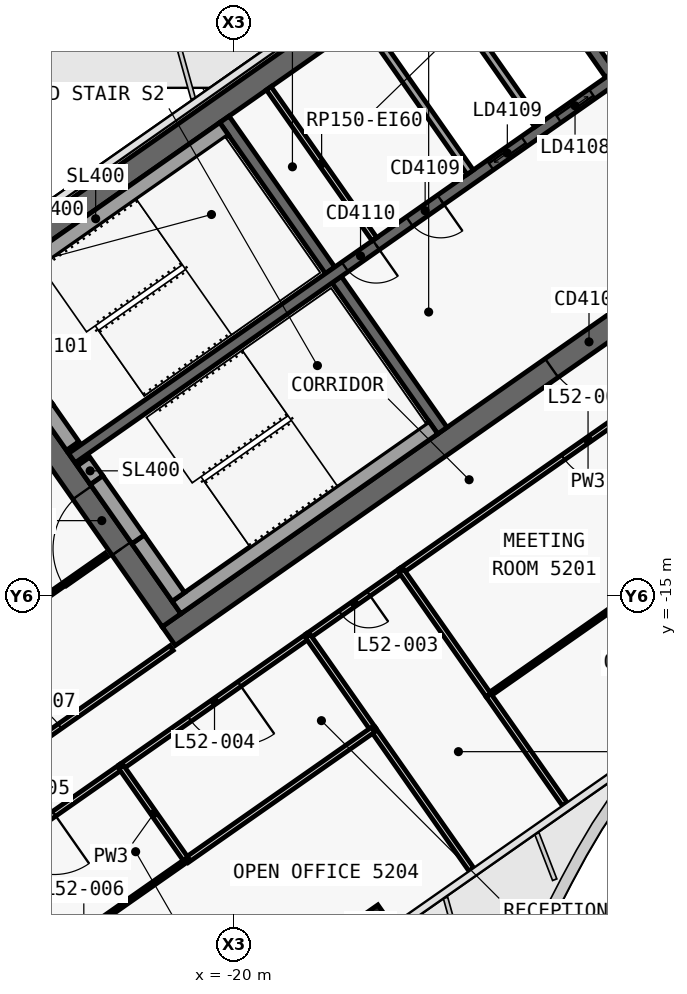
"""IFC4 building model, lengths in metres.
Left out: names, types, materials, properties, quantities, classifications, styles, units other than length and angle.
Written with IfcOpenShell. Run it as: python <this file> out.ifc"""

import sys

from ifc_helpers import new_model, si_unit, direction, frame, frame_2d, origin, origin_2d, place, context, subcontext, project, spatial, polyline, rectangle, outline, extrude, element, fill, save


model = new_model("IFC4")
c1 = context("Model", 3, precision=1e-05, world=origin(), true_north=direction((0.0, 1.0)))
c2 = subcontext(c1, "Body", "Model", "MODEL_VIEW")
j1 = project(units=[si_unit("LENGTHUNIT", "METRE"), si_unit("PLANEANGLEUNIT", "RADIAN")], contexts=[c1])
p1 = place(None, origin())
s1 = spatial("IfcSite", under=j1, at=p1, CompositionType="ELEMENT")
p2 = place(p1, origin())
s2 = spatial("IfcBuilding", under=s1, at=p2, CompositionType="ELEMENT")
p3 = place(p2, frame((0.0, 0.0, 225.4)))
s3 = spatial("IfcBuildingStorey", under=s2, at=p3, CompositionType="ELEMENT", Elevation=225.4)
p4 = place(p3, frame((-0.028, 12.066, 0.0), z_axis=(0.0, 0.0, 1.0), x_axis=(-0.819151382952, -0.573577380837, 0.0)))
e1 = element("IfcWall", 1, at=p4, inside=s3, PredefinedType="SHEAR", context=c2, shape_type="SweptSolid", body=[
    extrude(outline(polyline([(33.898, 0.3), (0.42, 0.3), (0.0, -0.3), (33.898, -0.3), (33.898, 0.3)])), origin(), (0.0, 0.0, 1.0), 3.9),
])
p5 = place(p3, frame((-0.028, -0.874, 0.0), z_axis=(0.0, 0.0, 1.0), x_axis=(-0.819150035022, -0.573579305871, 0.0)))
e2 = element("IfcWall", 2, at=p5, inside=s3, PredefinedType="SHEAR", context=c2, shape_type="SweptSolid", body=[
    extrude(outline(polyline([(26.476, 0.3), (0.42, 0.3), (0.0, -0.3), (26.476, -0.3), (26.476, 0.3)])), origin(), (0.0, 0.0, 1.0), 3.9),
])
p6 = place(p5, frame((2.976, 0.0, 0.0)))
e3 = element("IfcOpeningElement", 3, at=p6, cuts=e2, PredefinedType="OPENING", context=c2, shape_type="SweptSolid", body=[
    extrude(rectangle(XDim=2.4, YDim=2.1, at=frame_2d((1.2, 1.05))), frame((0.0, 0.31, 0.0), z_axis=(0.0, -1.0, 0.0), x_axis=(1.0, 0.0, 0.0)), (0.0, 0.0, 1.0), 0.62),
])
p7 = place(p5, frame((11.776, 0.0, 0.0)))
e4 = element("IfcOpeningElement", 4, at=p7, cuts=e2, PredefinedType="OPENING", context=c2, shape_type="SweptSolid", body=[
    extrude(rectangle(XDim=2.4, YDim=2.1, at=frame_2d((1.2, 1.05))), frame((0.0, 0.31, 0.0), z_axis=(0.0, -1.0, 0.0), x_axis=(1.0, 0.0, 0.0)), (0.0, 0.0, 1.0), 0.62),
])
p8 = place(p3, frame((-21.642, -15.642, 0.0), z_axis=(0.0, 0.0, 1.0), x_axis=(-0.573586866468, 0.819144740944, 0.0)))
e5 = element("IfcWall", 5, at=p8, inside=s3, PredefinedType="SHEAR", context=c2, shape_type="SweptSolid", body=[
    extrude(outline(polyline([(0.0, 0.3), (0.0, -0.3), (10.0, -0.3), (10.0, 0.3), (0.0, 0.3)])), origin(), (0.0, 0.0, 1.0), 3.9),
])
p9 = place(p8, frame((6.5, 0.0, 0.0)))
e6 = element("IfcOpeningElement", 6, at=p9, cuts=e5, PredefinedType="OPENING", context=c2, shape_type="SweptSolid", body=[
    extrude(rectangle(XDim=1.8, YDim=2.1, at=frame_2d((0.9, 1.05))), frame((0.0, 0.31, 0.0), z_axis=(0.0, -1.0, 0.0), x_axis=(1.0, 0.0, 0.0)), (0.0, 0.0, 1.0), 0.62),
])
p10 = place(p8, frame((2.3, 0.0, 0.0)))
e7 = element("IfcOpeningElement", 7, at=p10, cuts=e5, PredefinedType="OPENING", context=c2, shape_type="SweptSolid", body=[
    extrude(rectangle(XDim=1.8, YDim=2.1, at=frame_2d((0.9, 1.05))), frame((0.0, 0.31, 0.0), z_axis=(0.0, -1.0, 0.0), x_axis=(1.0, 0.0, 0.0)), (0.0, 0.0, 1.0), 0.62),
])
p11 = place(p3, frame((-10.097, -1.271, 0.0), z_axis=(0.0, 0.0, 1.0), x_axis=(-0.573560315113, 0.819163332265, 0.0)))
e8 = element("IfcWall", 8, at=p11, inside=s3, PredefinedType="SHEAR", context=c2, shape_type="SweptSolid", body=[
    extrude(outline(polyline([(4.85, -0.15), (4.85, 0.15), (0.0, 0.15), (0.0, -0.15), (4.85, -0.15)])), origin(), (0.0, 0.0, 1.0), 3.9),
])
p12 = place(p3, frame((-14.515, -10.652, 0.0), z_axis=(0.0, 0.0, 1.0), x_axis=(-0.573560315113, 0.819163332265, 0.0)))
e9 = element("IfcWall", 9, at=p12, inside=s3, PredefinedType="SHEAR", context=c2, shape_type="SweptSolid", body=[
    extrude(outline(polyline([(4.85, 0.15), (0.0, 0.15), (0.0, -0.15), (4.85, -0.15), (4.85, 0.15)])), origin(), (0.0, 0.0, 1.0), 3.9),
])
p13 = place(p3, frame((-17.469, -6.433, 0.0), z_axis=(0.0, 0.0, 1.0), x_axis=(-0.573594092424, 0.81913968109, 0.0)))
e10 = element("IfcWall", 10, at=p13, inside=s3, PredefinedType="SHEAR", context=c2, shape_type="SweptSolid", body=[
    extrude(outline(polyline([(4.85, -0.15), (4.85, 0.15), (0.0, 0.15), (0.0, -0.15), (4.85, -0.15)])), origin(), (0.0, 0.0, 1.0), 3.9),
])
p14 = place(p3, frame((-2.638, 3.768, 0.0), z_axis=(0.0, 0.0, 1.0), x_axis=(-0.819155014212, -0.573572194837, 0.0)))
e11 = element("IfcWall", 11, at=p14, inside=s3, PredefinedType="SHEAR", context=c2, shape_type="SweptSolid", body=[
    extrude(outline(polyline([(26.4, 0.15), (0.0, 0.15), (0.0, -0.15), (26.4, -0.15), (26.4, 0.15)])), origin(), (0.0, 0.0, 1.0), 3.9),
])
p15 = place(p14, frame((1.169, 0.0, 0.0)))
e12 = element("IfcOpeningElement", 12, at=p15, cuts=e11, PredefinedType="OPENING", context=c2, shape_type="SweptSolid", body=[
    extrude(rectangle(XDim=1.1, YDim=2.1, at=frame_2d((0.55, 1.05))), frame((0.0, 0.16, 0.0), z_axis=(0.0, -1.0, 0.0), x_axis=(1.0, 0.0, 0.0)), (0.0, 0.0, 1.0), 0.32),
])
p16 = place(p14, frame((3.206, 0.0, 0.0)))
e13 = element("IfcOpeningElement", 13, at=p16, cuts=e11, PredefinedType="OPENING", context=c2, shape_type="SweptSolid", body=[
    extrude(rectangle(XDim=1.1, YDim=2.1, at=frame_2d((0.55, 1.05))), frame((0.0, 0.16, 0.0), z_axis=(0.0, -1.0, 0.0), x_axis=(1.0, 0.0, 0.0)), (0.0, 0.0, 1.0), 0.32),
])
p17 = place(p14, frame((5.244, 0.0, 0.0)))
e14 = element("IfcOpeningElement", 14, at=p17, cuts=e11, PredefinedType="OPENING", context=c2, shape_type="SweptSolid", body=[
    extrude(rectangle(XDim=1.1, YDim=2.1, at=frame_2d((0.55, 1.05))), frame((0.0, 0.16, 0.0), z_axis=(0.0, -1.0, 0.0), x_axis=(1.0, 0.0, 0.0)), (0.0, 0.0, 1.0), 0.32),
])
p18 = place(p14, frame((7.281, 0.0, 0.0)))
e15 = element("IfcOpeningElement", 15, at=p18, cuts=e11, PredefinedType="OPENING", context=c2, shape_type="SweptSolid", body=[
    extrude(rectangle(XDim=1.1, YDim=2.1, at=frame_2d((0.55, 1.05))), frame((0.0, 0.16, 0.0), z_axis=(0.0, -1.0, 0.0), x_axis=(1.0, 0.0, 0.0)), (0.0, 0.0, 1.0), 0.32),
])
p19 = place(p14, frame((9.688, 0.0, 0.0)))
e16 = element("IfcOpeningElement", 16, at=p19, cuts=e11, PredefinedType="OPENING", context=c2, shape_type="SweptSolid", body=[
    extrude(rectangle(XDim=1.1, YDim=2.1, at=frame_2d((0.55, 1.05))), frame((0.0, 0.16, 0.0), z_axis=(0.0, -1.0, 0.0), x_axis=(1.0, 0.0, 0.0)), (0.0, 0.0, 1.0), 0.32),
])
p20 = place(p14, frame((11.863, 0.0, 0.0)))
e17 = element("IfcOpeningElement", 17, at=p20, cuts=e11, PredefinedType="OPENING", context=c2, shape_type="SweptSolid", body=[
    extrude(rectangle(XDim=1.1, YDim=2.1, at=frame_2d((0.55, 1.05))), frame((0.0, 0.16, 0.0), z_axis=(0.0, -1.0, 0.0), x_axis=(1.0, 0.0, 0.0)), (0.0, 0.0, 1.0), 0.32),
])
p21 = place(p14, frame((14.552, 0.0, 0.0)))
e18 = element("IfcOpeningElement", 18, at=p21, cuts=e11, PredefinedType="OPENING", context=c2, shape_type="SweptSolid", body=[
    extrude(rectangle(XDim=1.0, YDim=2.1, at=frame_2d((0.5, 1.05))), frame((0.0, 0.16, 0.0), z_axis=(0.0, -1.0, 0.0), x_axis=(1.0, 0.0, 0.0)), (0.0, 0.0, 1.0), 0.32),
])
p22 = place(p14, frame((16.627, 0.0, 0.0)))
e19 = element("IfcOpeningElement", 19, at=p22, cuts=e11, PredefinedType="OPENING", context=c2, shape_type="SweptSolid", body=[
    extrude(rectangle(XDim=1.0, YDim=2.1, at=frame_2d((0.5, 1.05))), frame((0.0, 0.16, 0.0), z_axis=(0.0, -1.0, 0.0), x_axis=(1.0, 0.0, 0.0)), (0.0, 0.0, 1.0), 0.32),
])
p23 = place(p3, frame((-16.41, -23.637, 0.0), z_axis=(0.0, 0.0, 1.0), x_axis=(-0.819152044289, -0.573576436351, 0.0)))
e20 = element("IfcColumn", 20, at=p23, inside=s3, PredefinedType="COLUMN", context=c2, shape_type="SweptSolid", body=[
    extrude(rectangle(XDim=0.9, YDim=0.6, at=origin_2d()), origin(), (0.0, 0.0, 1.0), 3.9),
])
p24 = place(p3, frame((-16.302, -5.616, 0.0), z_axis=(0.0, 0.0, 1.0), x_axis=(-0.573560315113, 0.819163332265, 0.0)))
e21 = element("IfcWall", 21, at=p24, inside=s3, PredefinedType="PARTITIONING", context=c2, shape_type="SweptSolid", body=[
    extrude(rectangle(XDim=4.85, YDim=0.15, at=frame_2d((2.425, 0.0))), origin(), (0.0, 0.0, 1.0), 3.62),
])
p25 = place(p3, frame((-12.001, -2.605, 0.0), z_axis=(0.0, 0.0, 1.0), x_axis=(-0.573560315113, 0.819163332265, 0.0)))
e22 = element("IfcWall", 22, at=p25, inside=s3, PredefinedType="SOLIDWALL", context=c2, shape_type="SweptSolid", body=[
    extrude(rectangle(XDim=4.85, YDim=0.2, at=frame_2d((2.425, 0.0))), origin(), (0.0, 0.0, 1.0), 3.9),
])
p26 = place(p3, frame((-13.783, -3.852, 0.0), z_axis=(0.0, 0.0, 1.0), x_axis=(-0.573594092424, 0.81913968109, 0.0)))
e23 = element("IfcWall", 23, at=p26, inside=s3, PredefinedType="SOLIDWALL", context=c2, shape_type="SweptSolid", body=[
    extrude(rectangle(XDim=4.85, YDim=0.2, at=frame_2d((2.425, 0.0))), origin(), (0.0, 0.0, 1.0), 3.9),
])
p27 = place(p3, frame((-20.259, -2.71, 0.0), z_axis=(0.0, 0.0, 1.0), x_axis=(-0.81914849389, -0.573581506813, 0.0)))
e24 = element("IfcWall", 24, at=p27, inside=s3, PredefinedType="SOLIDWALL", context=c2, shape_type="SweptSolid", body=[
    extrude(rectangle(XDim=8.25, YDim=0.4, at=frame_2d((4.125, 0.0))), origin(), (0.0, 0.0, 1.0), 3.62),
])
p28 = place(p3, frame((-24.244, -11.055, 0.0), z_axis=(0.0, 0.0, 1.0), x_axis=(-0.573571582932, 0.819155442668, 0.0)))
e25 = element("IfcWall", 25, at=p28, inside=s3, PredefinedType="SOLIDWALL", context=c2, shape_type="SweptSolid", body=[
    extrude(rectangle(XDim=1.2, YDim=0.4, at=frame_2d((0.6, 0.0))), origin(), (0.0, 0.0, 1.0), 3.62),
])
p29 = place(p3, frame((-24.932, -10.072, 2.15), z_axis=(0.0, 0.0, 1.0), x_axis=(-0.573591692345, 0.819141361715, 0.0)))
e26 = element("IfcWall", 26, at=p29, inside=s3, PredefinedType="SOLIDWALL", context=c2, shape_type="SweptSolid", body=[
    extrude(rectangle(XDim=1.9, YDim=0.4, at=frame_2d((0.95, 0.0))), origin(), (0.0, 0.0, 1.0), 1.47),
])
p30 = place(p3, frame((-14.753, -10.574, 0.0), z_axis=(0.0, 0.0, 1.0), x_axis=(-0.819158229677, -0.573567602601, 0.0)))
e27 = element("IfcWall", 27, at=p30, inside=s3, PredefinedType="SOLIDWALL", context=c2, shape_type="SweptSolid", body=[
    extrude(rectangle(XDim=8.25, YDim=0.4, at=frame_2d((4.125, 0.0))), origin(), (0.0, 0.0, 1.0), 3.62),
])
p31 = place(p3, frame((-21.462, -15.028, 0.0), z_axis=(0.0, 0.0, 1.0), x_axis=(-0.573559770908, 0.819163713305, 0.0)))
e28 = element("IfcWall", 28, at=p31, inside=s3, PredefinedType="SOLIDWALL", context=c2, shape_type="SweptSolid", body=[
    extrude(rectangle(XDim=1.85, YDim=0.4, at=frame_2d((0.925, 0.0))), origin(), (0.0, 0.0, 1.0), 3.62),
])
p32 = place(p3, frame((-23.613, -11.956, 0.0), z_axis=(0.0, 0.0, 1.0), x_axis=(-0.573435029941, 0.819251039936, 0.0)))
e29 = element("IfcWall", 29, at=p32, inside=s3, PredefinedType="SOLIDWALL", context=c2, shape_type="SweptSolid", body=[
    extrude(rectangle(XDim=0.6, YDim=0.4, at=frame_2d((0.3, 0.0))), origin(), (0.0, 0.0, 1.0), 3.62),
])
p33 = place(p3, frame((-22.523, -13.512, 2.15), z_axis=(0.0, 0.0, 1.0), x_axis=(-0.573591692345, 0.819141361715, 0.0)))
e30 = element("IfcWall", 30, at=p33, inside=s3, PredefinedType="SOLIDWALL", context=c2, shape_type="SweptSolid", body=[
    extrude(rectangle(XDim=1.9, YDim=0.4, at=frame_2d((0.95, 0.0))), origin(), (0.0, 0.0, 1.0), 1.47),
])
p34 = place(p3, frame((-28.834, -21.411, 0.0), z_axis=(0.0, 0.0, 1.0), x_axis=(0.819144386599, 0.57358737251, 0.0)))
e31 = element("IfcWall", 31, at=p34, inside=s3, PredefinedType="PARTITIONING", context=c2, shape_type="SweptSolid", body=[
    extrude(rectangle(XDim=8.78, YDim=0.15, at=frame_2d((4.39, 0.0))), origin(), (0.0, 0.0, 1.0), 3.05),
])
p35 = place(p34, frame((3.59, 0.0, 0.0)))
e32 = element("IfcOpeningElement", 32, at=p35, cuts=e31, PredefinedType="OPENING", context=c2, shape_type="SweptSolid", body=[
    extrude(rectangle(XDim=1.6, YDim=2.1, at=frame_2d((0.8, 1.05))), frame((0.0, 0.085, 0.0), z_axis=(0.0, -1.0, 0.0), x_axis=(1.0, 0.0, 0.0)), (0.0, 0.0, 1.0), 0.17),
])
p36 = place(p3, frame((-5.766, -7.456, 0.0), z_axis=(0.0, 0.0, 1.0), x_axis=(-0.81915546166, -0.573571555809, 0.0)))
e33 = element("IfcWall", 33, at=p36, inside=s3, PredefinedType="PARTITIONING", context=c2, shape_type="SweptSolid", body=[
    extrude(rectangle(XDim=12.002, YDim=0.15, at=frame_2d((6.001, 0.0))), origin(), (0.0, 0.0, 1.0), 3.05),
])
p37 = place(p36, frame((5.201, 0.0, 0.0)))
e34 = element("IfcOpeningElement", 34, at=p37, cuts=e33, PredefinedType="OPENING", context=c2, shape_type="SweptSolid", body=[
    extrude(rectangle(XDim=1.6, YDim=2.1, at=frame_2d((0.8, 1.05))), frame((0.0, 0.085, 0.0), z_axis=(0.0, -1.0, 0.0), x_axis=(1.0, 0.0, 0.0)), (0.0, 0.0, 1.0), 0.17),
])
p38 = place(p3, frame((-15.594, -14.338, 0.0), z_axis=(0.0, 0.0, 1.0), x_axis=(-0.819193738533, -0.573516886193, 0.0)))
e35 = element("IfcWall", 35, at=p38, inside=s3, PredefinedType="PARTITIONING", context=c2, shape_type="SweptSolid", body=[
    extrude(rectangle(XDim=3.004, YDim=0.15, at=frame_2d((1.502, 0.0))), origin(), (0.0, 0.0, 1.0), 3.62),
])
p39 = place(p38, frame((1.052, 0.0, 0.0)))
e36 = element("IfcOpeningElement", 36, at=p39, cuts=e35, PredefinedType="OPENING", context=c2, shape_type="SweptSolid", body=[
    extrude(rectangle(XDim=0.9, YDim=2.1, at=frame_2d((0.45, 1.05))), frame((0.0, 0.085, 0.0), z_axis=(0.0, -1.0, 0.0), x_axis=(1.0, 0.0, 0.0)), (0.0, 0.0, 1.0), 0.17),
])
p40 = place(p3, frame((-18.052, -16.058, 0.0), z_axis=(0.0, 0.0, 1.0), x_axis=(-0.819145946981, -0.573585144111, 0.0)))
e37 = element("IfcWall", 37, at=p40, inside=s3, PredefinedType="PARTITIONING", context=c2, shape_type="SweptSolid", body=[
    extrude(rectangle(XDim=6.004, YDim=0.15, at=frame_2d((3.002, 0.0))), origin(), (0.0, 0.0, 1.0), 3.05),
])
p41 = place(p40, frame((2.202, 0.0, 0.0)))
e38 = element("IfcOpeningElement", 38, at=p41, cuts=e37, PredefinedType="OPENING", context=c2, shape_type="SweptSolid", body=[
    extrude(rectangle(XDim=1.6, YDim=2.1, at=frame_2d((0.8, 1.05))), frame((0.0, 0.085, 0.0), z_axis=(0.0, -1.0, 0.0), x_axis=(1.0, 0.0, 0.0)), (0.0, 0.0, 1.0), 0.17),
])
p42 = place(p3, frame((-22.967, -19.5, 0.0), z_axis=(0.0, 0.0, 1.0), x_axis=(-0.819156123335, -0.573570610825, 0.0)))
e39 = element("IfcWall", 39, at=p42, inside=s3, PredefinedType="PARTITIONING", context=c2, shape_type="SweptSolid", body=[
    extrude(rectangle(XDim=5.902, YDim=0.15, at=frame_2d((2.951, 0.0))), origin(), (0.0, 0.0, 1.0), 3.05),
])
p43 = place(p42, frame((2.151, 0.0, 0.0)))
e40 = element("IfcOpeningElement", 40, at=p43, cuts=e39, PredefinedType="OPENING", context=c2, shape_type="SweptSolid", body=[
    extrude(rectangle(XDim=1.6, YDim=2.1, at=frame_2d((0.8, 1.05))), frame((0.0, 0.085, 0.0), z_axis=(0.0, -1.0, 0.0), x_axis=(1.0, 0.0, 0.0)), (0.0, 0.0, 1.0), 0.17),
])
p44 = place(p3, frame((-31.129, -19.354, 0.0), z_axis=(0.0, 0.0, 1.0), x_axis=(0.819154480923, 0.573572956461, 0.0)))
e41 = element("IfcWall", 41, at=p44, inside=s3, PredefinedType="PARTITIONING", context=c2, shape_type="SweptSolid", body=[
    extrude(rectangle(XDim=9.48, YDim=0.1, at=frame_2d((4.74, 0.0))), origin(), (0.0, 0.0, 1.0), 3.0),
])
p45 = place(p44, frame((4.29, 0.0, 0.0)))
e42 = element("IfcOpeningElement", 42, at=p45, cuts=e41, PredefinedType="OPENING", context=c2, shape_type="SweptSolid", body=[
    extrude(rectangle(XDim=0.9, YDim=2.1, at=frame_2d((0.45, 1.05))), frame((0.0, 0.06, 0.0), z_axis=(0.0, -1.0, 0.0), x_axis=(1.0, 0.0, 0.0)), (0.0, 0.0, 1.0), 0.12),
])
p46 = place(p3, frame((-3.471, -10.733, 0.0), z_axis=(0.0, 0.0, 1.0), x_axis=(-0.819146845232, -0.573583861302, 0.0)))
e43 = element("IfcWall", 43, at=p46, inside=s3, PredefinedType="PARTITIONING", context=c2, shape_type="SweptSolid", body=[
    extrude(rectangle(XDim=12.0, YDim=0.1, at=frame_2d((6.0, 0.0))), origin(), (0.0, 0.0, 1.0), 3.05),
])
p47 = place(p46, frame((5.55, 0.0, 0.0)))
e44 = element("IfcOpeningElement", 44, at=p47, cuts=e43, PredefinedType="OPENING", context=c2, shape_type="SweptSolid", body=[
    extrude(rectangle(XDim=0.9, YDim=2.1, at=frame_2d((0.45, 1.05))), frame((0.0, 0.06, 0.0), z_axis=(0.0, -1.0, 0.0), x_axis=(1.0, 0.0, 0.0)), (0.0, 0.0, 1.0), 0.12),
])
p48 = place(p3, frame((-11.294, -20.482, 0.0), z_axis=(0.0, 0.0, 1.0), x_axis=(-0.573555999232, 0.819166354134, 0.0)))
e45 = element("IfcWall", 45, at=p48, inside=s3, PredefinedType="PARTITIONING", context=c2, shape_type="SweptSolid", body=[
    extrude(rectangle(XDim=3.499, YDim=0.15, at=frame_2d((1.75, 0.0))), origin(), (0.0, 0.0, 1.0), 3.0),
])
p49 = place(p3, frame((-13.302, -17.615, 0.0), z_axis=(0.0, 0.0, 1.0), x_axis=(-0.573556557423, 0.819165963305, 0.0)))
e46 = element("IfcWall", 46, at=p49, inside=s3, PredefinedType="PARTITIONING", context=c2, shape_type="SweptSolid", body=[
    extrude(rectangle(XDim=4.0, YDim=0.15, at=frame_2d((2.0, 0.0))), origin(), (0.0, 0.0, 1.0), 3.62),
])
p50 = place(p3, frame((-16.332, -18.519, 0.0), z_axis=(0.0, 0.0, 1.0), x_axis=(-0.573604249862, 0.819132568355, 0.0)))
e47 = element("IfcWall", 47, at=p50, inside=s3, PredefinedType="PARTITIONING", context=c2, shape_type="SweptSolid", body=[
    extrude(rectangle(XDim=3.002, YDim=0.15, at=frame_2d((1.501, 0.0))), origin(), (0.0, 0.0, 1.0), 3.62),
])
p51 = place(p3, frame((-13.752, -22.203, 0.0), z_axis=(0.0, 0.0, 1.0), x_axis=(-0.573593387921, 0.81914017441, 0.0)))
e48 = element("IfcWall", 48, at=p51, inside=s3, PredefinedType="PARTITIONING", context=c2, shape_type="SweptSolid", body=[
    extrude(rectangle(XDim=4.501, YDim=0.15, at=frame_2d((2.25, 0.0))), origin(), (0.0, 0.0, 1.0), 3.0),
])
p52 = place(p3, frame((-16.333, -18.517, 0.0), z_axis=(0.0, 0.0, 1.0), x_axis=(-0.819130592339, -0.573607071691, 0.0)))
e49 = element("IfcWall", 49, at=p52, inside=s3, PredefinedType="PARTITIONING", context=c2, shape_type="SweptSolid", body=[
    extrude(rectangle(XDim=6.0, YDim=0.15, at=frame_2d((3.0, 0.0))), origin(), (0.0, 0.0, 1.0), 3.05),
])
p53 = place(p3, frame((-21.248, -21.958, 0.0), z_axis=(0.0, 0.0, 1.0), x_axis=(-0.573560650686, 0.819163097304, 0.0)))
e50 = element("IfcWall", 50, at=p53, inside=s3, PredefinedType="PARTITIONING", context=c2, shape_type="SweptSolid", body=[
    extrude(rectangle(XDim=3.0, YDim=0.15, at=frame_2d((1.5, 0.0))), origin(), (0.0, 0.0, 1.0), 3.62),
])
p54 = place(p3, frame((-21.247, -21.959, 0.0), z_axis=(0.0, 0.0, 1.0), x_axis=(-0.819141541656, -0.573591435374, 0.0)))
e51 = element("IfcWall", 51, at=p54, inside=s3, PredefinedType="PARTITIONING", context=c2, shape_type="SweptSolid", body=[
    extrude(rectangle(XDim=6.6, YDim=0.1, at=frame_2d((3.3, 0.0))), origin(), (0.0, 0.0, 1.0), 3.0),
])
p55 = place(p54, frame((2.85, 0.0, 0.0)))
e52 = element("IfcOpeningElement", 52, at=p55, cuts=e51, PredefinedType="OPENING", context=c2, shape_type="SweptSolid", body=[
    extrude(rectangle(XDim=0.9, YDim=2.1, at=frame_2d((0.45, 1.05))), frame((0.0, 0.06, 0.0), z_axis=(0.0, -1.0, 0.0), x_axis=(1.0, 0.0, 0.0)), (0.0, 0.0, 1.0), 0.12),
])
p56 = place(p19, origin())
e53 = element("IfcDoor", 53, at=p56, inside=s3, OperationType="SLIDING_TO_LEFT", PredefinedType="DOOR", context=c2, shape_type="SweptSolid", body=[
    extrude(rectangle(XDim=1.1, YDim=2.1, at=frame_2d((0.55, 1.05))), frame((0.0, 0.025, 0.0), z_axis=(0.0, -1.0, 0.0), x_axis=(1.0, 0.0, 0.0)), (0.0, 0.0, 1.0), 0.05),
])
fill(e16, e53)
p57 = place(p20, origin())
e54 = element("IfcDoor", 54, at=p57, inside=s3, OperationType="SLIDING_TO_RIGHT", PredefinedType="DOOR", context=c2, shape_type="SweptSolid", body=[
    extrude(rectangle(XDim=1.1, YDim=2.1, at=frame_2d((0.55, 1.05))), frame((0.0, 0.025, 0.0), z_axis=(0.0, -1.0, 0.0), x_axis=(1.0, 0.0, 0.0)), (0.0, 0.0, 1.0), 0.05),
])
fill(e17, e54)
p58 = place(p21, origin())
e55 = element("IfcDoor", 55, at=p58, inside=s3, OperationType="SINGLE_SWING_RIGHT", PredefinedType="DOOR", context=c2, shape_type="SweptSolid", body=[
    extrude(rectangle(XDim=1.0, YDim=2.1, at=frame_2d((0.5, 1.05))), frame((0.0, 0.025, 0.0), z_axis=(0.0, -1.0, 0.0), x_axis=(1.0, 0.0, 0.0)), (0.0, 0.0, 1.0), 0.05),
])
fill(e18, e55)
p59 = place(p22, origin())
e56 = element("IfcDoor", 56, at=p59, inside=s3, OperationType="SINGLE_SWING_RIGHT", PredefinedType="DOOR", context=c2, shape_type="SweptSolid", body=[
    extrude(rectangle(XDim=1.0, YDim=2.1, at=frame_2d((0.5, 1.05))), frame((0.0, 0.025, 0.0), z_axis=(0.0, -1.0, 0.0), x_axis=(1.0, 0.0, 0.0)), (0.0, 0.0, 1.0), 0.05),
])
fill(e19, e56)
p60 = place(p7, origin())
e57 = element("IfcDoor", 57, at=p60, inside=s3, OperationType="DOUBLE_DOOR_SINGLE_SWING", PredefinedType="DOOR", context=c2, shape_type="SweptSolid", body=[
    extrude(rectangle(XDim=2.4, YDim=2.1, at=frame_2d((1.2, 1.05))), frame((0.0, 0.025, 0.0), z_axis=(0.0, -1.0, 0.0), x_axis=(1.0, 0.0, 0.0)), (0.0, 0.0, 1.0), 0.05),
])
fill(e4, e57)
p61 = place(p10, origin())
e58 = element("IfcDoor", 58, at=p61, inside=s3, OperationType="DOUBLE_DOOR_SINGLE_SWING", PredefinedType="DOOR", context=c2, shape_type="SweptSolid", body=[
    extrude(rectangle(XDim=1.8, YDim=2.1, at=frame_2d((0.9, 1.05))), frame((0.0, 0.025, 0.0), z_axis=(0.0, -1.0, 0.0), x_axis=(1.0, 0.0, 0.0)), (0.0, 0.0, 1.0), 0.05),
])
fill(e7, e58)
p62 = place(p37, origin())
e59 = element("IfcDoor", 59, at=p62, inside=s3, OperationType="DOUBLE_DOOR_SINGLE_SWING", PredefinedType="DOOR", context=c2, shape_type="SweptSolid", body=[
    extrude(rectangle(XDim=1.6, YDim=2.1, at=frame_2d((0.8, 1.05))), frame((0.0, 0.025, 0.0), z_axis=(0.0, -1.0, 0.0), x_axis=(1.0, 0.0, 0.0)), (0.0, 0.0, 1.0), 0.05),
])
fill(e34, e59)
p63 = place(p39, origin())
e60 = element("IfcDoor", 60, at=p63, inside=s3, OperationType="SINGLE_SWING_RIGHT", PredefinedType="DOOR", context=c2, shape_type="SweptSolid", body=[
    extrude(rectangle(XDim=0.9, YDim=2.1, at=frame_2d((0.45, 1.05))), frame((0.0, 0.025, 0.0), z_axis=(0.0, -1.0, 0.0), x_axis=(1.0, 0.0, 0.0)), (0.0, 0.0, 1.0), 0.05),
])
fill(e36, e60)
p64 = place(p41, origin())
e61 = element("IfcDoor", 61, at=p64, inside=s3, OperationType="DOUBLE_DOOR_SINGLE_SWING", PredefinedType="DOOR", context=c2, shape_type="SweptSolid", body=[
    extrude(rectangle(XDim=1.6, YDim=2.1, at=frame_2d((0.8, 1.05))), frame((0.0, 0.025, 0.0), z_axis=(0.0, -1.0, 0.0), x_axis=(1.0, 0.0, 0.0)), (0.0, 0.0, 1.0), 0.05),
])
fill(e38, e61)
p65 = place(p43, origin())
e62 = element("IfcDoor", 62, at=p65, inside=s3, OperationType="DOUBLE_DOOR_SINGLE_SWING", PredefinedType="DOOR", context=c2, shape_type="SweptSolid", body=[
    extrude(rectangle(XDim=1.6, YDim=2.1, at=frame_2d((0.8, 1.05))), frame((0.0, 0.025, 0.0), z_axis=(0.0, -1.0, 0.0), x_axis=(1.0, 0.0, 0.0)), (0.0, 0.0, 1.0), 0.05),
])
fill(e40, e62)
p66 = place(p35, origin())
e63 = element("IfcDoor", 63, at=p66, inside=s3, OperationType="DOUBLE_DOOR_SINGLE_SWING", PredefinedType="DOOR", context=c2, shape_type="SweptSolid", body=[
    extrude(rectangle(XDim=1.6, YDim=2.1, at=frame_2d((0.8, 1.05))), frame((0.0, 0.025, 0.0), z_axis=(0.0, -1.0, 0.0), x_axis=(1.0, 0.0, 0.0)), (0.0, 0.0, 1.0), 0.05),
])
fill(e32, e63)
save(model, sys.argv[1])
